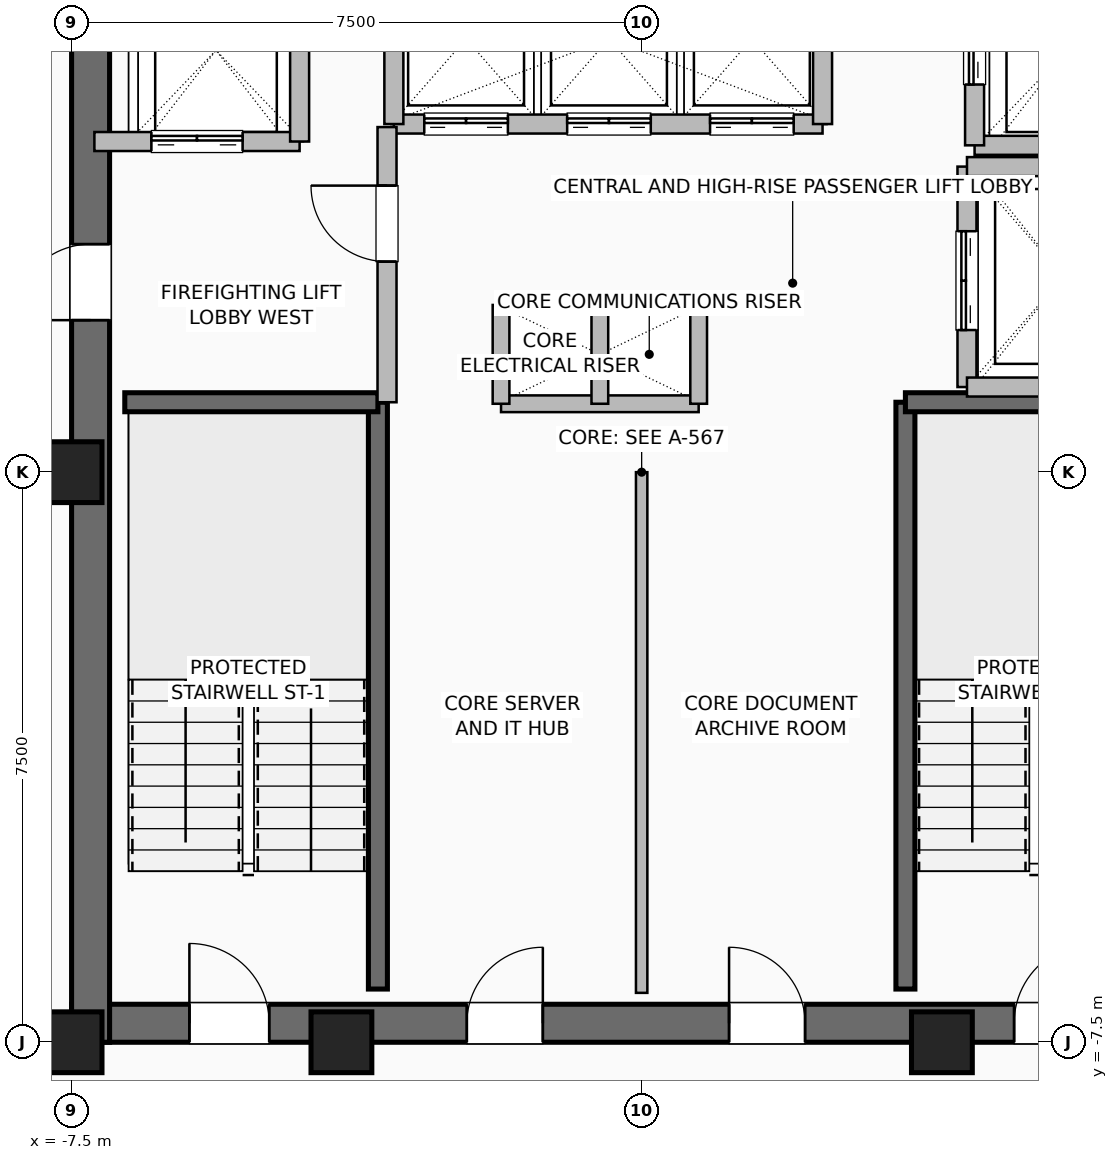
"""IFC4 building model, lengths in metres.
Left out: names, types, materials, properties, quantities, classifications, styles, units other than length and angle.
Written with IfcOpenShell. Run it as: python <this file> out.ifc"""

import sys

from ifc_helpers import new_model, si_unit, direction, frame, frame_2d, origin, origin_2d, place, context, subcontext, project, spatial, rectangle, hollow_rectangle, extrude, element, fill, save


model = new_model("IFC4")
c1 = context("Model", 3, precision=1e-05, world=origin(), true_north=direction((0.0, 1.0)))
c2 = subcontext(c1, "Body", "Model", "MODEL_VIEW")
j1 = project(units=[si_unit("LENGTHUNIT", "METRE"), si_unit("PLANEANGLEUNIT", "RADIAN")], contexts=[c1])
p1 = place(None, origin())
s1 = spatial("IfcSite", under=j1, at=p1, CompositionType="ELEMENT")
p2 = place(p1, origin())
s2 = spatial("IfcBuilding", under=s1, at=p2, CompositionType="ELEMENT")
p3 = place(p2, frame((0.0, 0.0, 268.4)))
s3 = spatial("IfcBuildingStorey", under=s2, at=p3, CompositionType="ELEMENT", Elevation=268.4)
for number, where, z_axis, x_axis in (
    (1, (-7.5, -7.5, 0.0), (0.0, 0.0, 1.0), (1.0, 0.0, 0.0)),
    (2, (-3.95, -7.5, 0.0), (0.0, 0.0, 1.0), (1.0, 0.0, 0.0)),
    (3, (3.95, -7.5, 0.0), (0.0, 0.0, 1.0), (1.0, 0.0, 0.0)),
    (4, (-7.5, 0.0, 0.0), (0.0, 0.0, 1.0), (1.0, 0.0, 0.0)),
):
    element("IfcColumn", number, at=place(p3, frame(where, z_axis=z_axis, x_axis=x_axis)), inside=s3, PredefinedType="COLUMN", context=c2, shape_type="SweptSolid", body=[
        extrude(hollow_rectangle(XDim=0.8, YDim=0.8, WallThickness=0.04, at=origin_2d()), origin(), (0.0, 0.0, 1.0), 3.6),
    ])
p4 = place(p3, frame((-7.5, -7.25, 0.0), z_axis=(0.0, 0.0, 1.0), x_axis=(1.0, 0.0, 0.0)))
e5 = element("IfcWall", 5, at=p4, inside=s3, PredefinedType="SHEAR", context=c2, shape_type="SweptSolid", body=[
    extrude(rectangle(XDim=15.0, YDim=0.5, at=frame_2d((7.5, 0.0))), origin(), (0.0, 0.0, 1.0), 3.36),
])
p5 = place(p4, frame((1.55, 0.0, 0.0)))
e6 = element("IfcOpeningElement", 6, at=p5, cuts=e5, PredefinedType="OPENING", context=c2, shape_type="SweptSolid", body=[
    extrude(rectangle(XDim=1.05, YDim=2.08, at=frame_2d((0.525, 1.04))), frame((0.0, 0.26, 0.0), z_axis=(0.0, -1.0, 0.0), x_axis=(1.0, 0.0, 0.0)), (0.0, 0.0, 1.0), 0.52),
])
p6 = place(p4, frame((12.4, 0.0, 0.0)))
e7 = element("IfcOpeningElement", 7, at=p6, cuts=e5, PredefinedType="OPENING", context=c2, shape_type="SweptSolid", body=[
    extrude(rectangle(XDim=1.05, YDim=2.08, at=frame_2d((0.525, 1.04))), frame((0.0, 0.26, 0.0), z_axis=(0.0, -1.0, 0.0), x_axis=(1.0, 0.0, 0.0)), (0.0, 0.0, 1.0), 0.52),
])
p7 = place(p4, frame((5.2, 0.0, 0.0)))
e8 = element("IfcOpeningElement", 8, at=p7, cuts=e5, PredefinedType="OPENING", context=c2, shape_type="SweptSolid", body=[
    extrude(rectangle(XDim=1.0, YDim=2.08, at=frame_2d((0.5, 1.04))), frame((0.0, 0.26, 0.0), z_axis=(0.0, -1.0, 0.0), x_axis=(1.0, 0.0, 0.0)), (0.0, 0.0, 1.0), 0.52),
])
p8 = place(p4, frame((8.65, 0.0, 0.0)))
e9 = element("IfcOpeningElement", 9, at=p8, cuts=e5, PredefinedType="OPENING", context=c2, shape_type="SweptSolid", body=[
    extrude(rectangle(XDim=1.0, YDim=2.08, at=frame_2d((0.5, 1.04))), frame((0.0, 0.26, 0.0), z_axis=(0.0, -1.0, 0.0), x_axis=(1.0, 0.0, 0.0)), (0.0, 0.0, 1.0), 0.52),
])
p9 = place(p3, frame((-7.25, -7.5, 0.0), z_axis=(0.0, 0.0, 1.0), x_axis=(0.0, 1.0, 0.0)))
e10 = element("IfcWall", 10, at=p9, inside=s3, PredefinedType="SHEAR", context=c2, shape_type="SweptSolid", body=[
    extrude(rectangle(XDim=15.0, YDim=0.5, at=frame_2d((7.5, 0.0))), origin(), (0.0, 0.0, 1.0), 3.36),
])
p10 = place(p9, frame((9.5, 0.0, 0.0)))
e11 = element("IfcOpeningElement", 11, at=p10, cuts=e10, PredefinedType="OPENING", context=c2, shape_type="SweptSolid", body=[
    extrude(rectangle(XDim=1.0, YDim=2.08, at=frame_2d((0.5, 1.04))), frame((0.0, 0.26, 0.0), z_axis=(0.0, -1.0, 0.0), x_axis=(1.0, 0.0, 0.0)), (0.0, 0.0, 1.0), 0.52),
])
p11 = place(p3, frame((-3.47, -6.8, 0.0), z_axis=(0.0, 0.0, 1.0), x_axis=(0.0, 1.0, 0.0)))
e12 = element("IfcWall", 12, at=p11, inside=s3, PredefinedType="SHEAR", context=c2, shape_type="SweptSolid", body=[
    extrude(rectangle(XDim=7.72, YDim=0.25, at=frame_2d((3.86, 0.0))), origin(), (0.0, 0.0, 1.0), 3.36),
])
p12 = place(p3, frame((-6.8, 0.92, 0.0), z_axis=(0.0, 0.0, 1.0), x_axis=(1.0, 0.0, 0.0)))
e13 = element("IfcWall", 13, at=p12, inside=s3, PredefinedType="SHEAR", context=c2, shape_type="SweptSolid", body=[
    extrude(rectangle(XDim=3.33, YDim=0.25, at=frame_2d((1.665, 0.0))), origin(), (0.0, 0.0, 1.0), 3.36),
])
p13 = place(p3, frame((3.47, -6.8, 0.0), z_axis=(0.0, 0.0, 1.0), x_axis=(0.0, 1.0, 0.0)))
e14 = element("IfcWall", 14, at=p13, inside=s3, PredefinedType="SHEAR", context=c2, shape_type="SweptSolid", body=[
    extrude(rectangle(XDim=7.72, YDim=0.25, at=frame_2d((3.86, 0.0))), origin(), (0.0, 0.0, 1.0), 3.36),
])
p14 = place(p3, frame((3.47, 0.92, 0.0), z_axis=(0.0, 0.0, 1.0), x_axis=(1.0, 0.0, 0.0)))
e15 = element("IfcWall", 15, at=p14, inside=s3, PredefinedType="SHEAR", context=c2, shape_type="SweptSolid", body=[
    extrude(rectangle(XDim=3.33, YDim=0.25, at=frame_2d((1.665, 0.0))), origin(), (0.0, 0.0, 1.0), 3.36),
])
for number, where, z_axis, x_axis in (
    (16, (-1.85, 2.2, 0.0), (0.0, 0.0, 1.0), (1.0, 0.0, 0.0)),
    (17, (-1.85, 0.9, 0.0), (0.0, 0.0, 1.0), (1.0, 0.0, 0.0)),
):
    element("IfcWall", number, at=place(p3, frame(where, z_axis=z_axis, x_axis=x_axis)), inside=s3, PredefinedType="PARTITIONING", context=c2, shape_type="SweptSolid", body=[
        extrude(rectangle(XDim=2.6, YDim=0.22, at=frame_2d((1.3, 0.0))), origin(), (0.0, 0.0, 1.0), 3.36),
    ])
for number, where, z_axis, x_axis in (
    (18, (-0.55, 0.9, 0.0), (0.0, 0.0, 1.0), (0.0, 1.0, 0.0)),
    (19, (0.75, 0.9, 0.0), (0.0, 0.0, 1.0), (0.0, 1.0, 0.0)),
    (20, (-1.85, 0.9, 0.0), (0.0, 0.0, 1.0), (0.0, 1.0, 0.0)),
):
    element("IfcWall", number, at=place(p3, frame(where, z_axis=z_axis, x_axis=x_axis)), inside=s3, PredefinedType="PARTITIONING", context=c2, shape_type="SweptSolid", body=[
        extrude(rectangle(XDim=1.3, YDim=0.22, at=frame_2d((0.65, 0.0))), origin(), (0.0, 0.0, 1.0), 3.36),
    ])
p15 = place(p3, frame((-3.26, 4.58, 0.0), z_axis=(0.0, 0.0, 1.0), x_axis=(1.0, 0.0, 0.0)))
e21 = element("IfcWall", 21, at=p15, inside=s3, PredefinedType="SHEAR", context=c2, shape_type="SweptSolid", body=[
    extrude(rectangle(XDim=5.64, YDim=0.25, at=frame_2d((2.82, 0.0))), origin(), (0.0, 0.0, 1.0), 3.36),
])
p16 = place(p15, frame((0.4, 0.0, 0.0)))
e22 = element("IfcOpeningElement", 22, at=p16, cuts=e21, PredefinedType="OPENING", context=c2, shape_type="SweptSolid", body=[
    extrude(rectangle(XDim=1.1, YDim=2.2, at=frame_2d((0.55, 1.1))), frame((0.0, 0.135, 0.0), z_axis=(0.0, -1.0, 0.0), x_axis=(1.0, 0.0, 0.0)), (0.0, 0.0, 1.0), 0.27),
])
p17 = place(p15, frame((2.28, 0.0, 0.0)))
e23 = element("IfcOpeningElement", 23, at=p17, cuts=e21, PredefinedType="OPENING", context=c2, shape_type="SweptSolid", body=[
    extrude(rectangle(XDim=1.1, YDim=2.2, at=frame_2d((0.55, 1.1))), frame((0.0, 0.135, 0.0), z_axis=(0.0, -1.0, 0.0), x_axis=(1.0, 0.0, 0.0)), (0.0, 0.0, 1.0), 0.27),
])
p18 = place(p15, frame((4.16, 0.0, 0.0)))
e24 = element("IfcOpeningElement", 24, at=p18, cuts=e21, PredefinedType="OPENING", context=c2, shape_type="SweptSolid", body=[
    extrude(rectangle(XDim=1.1, YDim=2.2, at=frame_2d((0.55, 1.1))), frame((0.0, 0.135, 0.0), z_axis=(0.0, -1.0, 0.0), x_axis=(1.0, 0.0, 0.0)), (0.0, 0.0, 1.0), 0.27),
])
for number, where, z_axis, x_axis in (
    (25, (-3.26, 4.58, 0.0), (0.0, 0.0, 1.0), (0.0, 1.0, 0.0)),
    (26, (2.38, 4.58, 0.0), (0.0, 0.0, 1.0), (0.0, 1.0, 0.0)),
):
    element("IfcWall", number, at=place(p3, frame(where, z_axis=z_axis, x_axis=x_axis)), inside=s3, PredefinedType="SHEAR", context=c2, shape_type="SweptSolid", body=[
        extrude(rectangle(XDim=2.22, YDim=0.25, at=frame_2d((1.11, 0.0))), origin(), (0.0, 0.0, 1.0), 3.36),
    ])
p19 = place(p3, frame((-7.2, 4.35, 0.0), z_axis=(0.0, 0.0, 1.0), x_axis=(1.0, 0.0, 0.0)))
e27 = element("IfcWall", 27, at=p19, inside=s3, PredefinedType="SHEAR", context=c2, shape_type="SweptSolid", body=[
    extrude(rectangle(XDim=2.7, YDim=0.25, at=frame_2d((1.35, 0.0))), origin(), (0.0, 0.0, 1.0), 3.36),
])
p20 = place(p19, frame((0.75, 0.0, 0.0)))
e28 = element("IfcOpeningElement", 28, at=p20, cuts=e27, PredefinedType="OPENING", context=c2, shape_type="SweptSolid", body=[
    extrude(rectangle(XDim=1.2, YDim=2.2, at=frame_2d((0.6, 1.1))), frame((0.0, 0.135, 0.0), z_axis=(0.0, -1.0, 0.0), x_axis=(1.0, 0.0, 0.0)), (0.0, 0.0, 1.0), 0.27),
])
p21 = place(p3, frame((-4.5, 4.35, 0.0), z_axis=(0.0, 0.0, 1.0), x_axis=(0.0, 1.0, 0.0)))
e29 = element("IfcWall", 29, at=p21, inside=s3, PredefinedType="SHEAR", context=c2, shape_type="SweptSolid", body=[
    extrude(rectangle(XDim=2.85, YDim=0.25, at=frame_2d((1.425, 0.0))), origin(), (0.0, 0.0, 1.0), 3.36),
])
p22 = place(p3, frame((4.38, 4.3, 0.0), z_axis=(0.0, 0.0, 1.0), x_axis=(1.0, 0.0, 0.0)))
e30 = element("IfcWall", 30, at=p22, inside=s3, PredefinedType="SHEAR", context=c2, shape_type="SweptSolid", body=[
    extrude(rectangle(XDim=2.42, YDim=0.25, at=frame_2d((1.21, 0.0))), origin(), (0.0, 0.0, 1.0), 3.36),
])
p23 = place(p3, frame((4.38, 4.3, 0.0), z_axis=(0.0, 0.0, 1.0), x_axis=(0.0, 1.0, 0.0)))
e31 = element("IfcWall", 31, at=p23, inside=s3, PredefinedType="SHEAR", context=c2, shape_type="SweptSolid", body=[
    extrude(rectangle(XDim=2.5, YDim=0.25, at=frame_2d((1.25, 0.0))), origin(), (0.0, 0.0, 1.0), 3.36),
])
p24 = place(p23, frame((0.8, 0.0, 0.0)))
e32 = element("IfcOpeningElement", 32, at=p24, cuts=e31, PredefinedType="OPENING", context=c2, shape_type="SweptSolid", body=[
    extrude(rectangle(XDim=1.2, YDim=2.2, at=frame_2d((0.6, 1.1))), frame((0.0, 0.135, 0.0), z_axis=(0.0, -1.0, 0.0), x_axis=(1.0, 0.0, 0.0)), (0.0, 0.0, 1.0), 0.27),
])
p25 = place(p3, frame((4.28, 1.12, 0.0), z_axis=(0.0, 0.0, 1.0), x_axis=(0.0, 1.0, 0.0)))
e33 = element("IfcWall", 33, at=p25, inside=s3, PredefinedType="SHEAR", context=c2, shape_type="SweptSolid", body=[
    extrude(rectangle(XDim=2.9, YDim=0.25, at=frame_2d((1.45, 0.0))), origin(), (0.0, 0.0, 1.0), 3.36),
])
p26 = place(p25, frame((0.75, 0.0, 0.0)))
e34 = element("IfcOpeningElement", 34, at=p26, cuts=e33, PredefinedType="OPENING", context=c2, shape_type="SweptSolid", body=[
    extrude(rectangle(XDim=1.3, YDim=2.3, at=frame_2d((0.65, 1.15))), frame((0.0, 0.135, 0.0), z_axis=(0.0, -1.0, 0.0), x_axis=(1.0, 0.0, 0.0)), (0.0, 0.0, 1.0), 0.27),
])
for number, where, z_axis, x_axis in (
    (35, (4.28, 1.12, 0.0), (0.0, 0.0, 1.0), (1.0, 0.0, 0.0)),
    (36, (4.28, 4.02, 0.0), (0.0, 0.0, 1.0), (1.0, 0.0, 0.0)),
):
    element("IfcWall", number, at=place(p3, frame(where, z_axis=z_axis, x_axis=x_axis)), inside=s3, PredefinedType="SHEAR", context=c2, shape_type="SweptSolid", body=[
        extrude(rectangle(XDim=2.52, YDim=0.25, at=frame_2d((1.26, 0.0))), origin(), (0.0, 0.0, 1.0), 3.36),
    ])
p27 = place(p3, frame((-3.35, 0.92, 0.0), z_axis=(0.0, 0.0, 1.0), x_axis=(0.0, 1.0, 0.0)))
e37 = element("IfcWall", 37, at=p27, inside=s3, PredefinedType="SHEAR", context=c2, shape_type="SweptSolid", body=[
    extrude(rectangle(XDim=3.62, YDim=0.25, at=frame_2d((1.81, 0.0))), origin(), (0.0, 0.0, 1.0), 3.36),
])
p28 = place(p27, frame((1.85, 0.0, 0.0)))
e38 = element("IfcOpeningElement", 38, at=p28, cuts=e37, PredefinedType="OPENING", context=c2, shape_type="SweptSolid", body=[
    extrude(rectangle(XDim=1.0, YDim=2.08, at=frame_2d((0.5, 1.04))), frame((0.0, 0.135, 0.0), z_axis=(0.0, -1.0, 0.0), x_axis=(1.0, 0.0, 0.0)), (0.0, 0.0, 1.0), 0.27),
])
p29 = place(p3, frame((0.0, -6.85, 0.0), z_axis=(0.0, 0.0, 1.0), x_axis=(0.0, 1.0, 0.0)))
e39 = element("IfcWall", 39, at=p29, inside=s3, PredefinedType="PARTITIONING", context=c2, shape_type="SweptSolid", body=[
    extrude(rectangle(XDim=6.85, YDim=0.15, at=frame_2d((3.425, 0.0))), origin(), (0.0, 0.0, 1.0), 3.36),
])
p30 = place(p5, origin())
e40 = element("IfcDoor", 40, at=p30, inside=s3, OperationType="SINGLE_SWING_LEFT", PredefinedType="DOOR", context=c2, shape_type="SweptSolid", body=[
    extrude(rectangle(XDim=1.05, YDim=2.08, at=frame_2d((0.525, 1.04))), frame((0.0, 0.025, 0.0), z_axis=(0.0, -1.0, 0.0), x_axis=(1.0, 0.0, 0.0)), (0.0, 0.0, 1.0), 0.05),
])
fill(e6, e40)
p31 = place(p6, origin())
e41 = element("IfcDoor", 41, at=p31, inside=s3, OperationType="SINGLE_SWING_RIGHT", PredefinedType="DOOR", context=c2, shape_type="SweptSolid", body=[
    extrude(rectangle(XDim=1.05, YDim=2.08, at=frame_2d((0.525, 1.04))), frame((0.0, 0.025, 0.0), z_axis=(0.0, -1.0, 0.0), x_axis=(1.0, 0.0, 0.0)), (0.0, 0.0, 1.0), 0.05),
])
fill(e7, e41)
p32 = place(p10, origin())
e42 = element("IfcDoor", 42, at=p32, inside=s3, OperationType="SINGLE_SWING_LEFT", PredefinedType="DOOR", context=c2, shape_type="SweptSolid", body=[
    extrude(rectangle(XDim=1.0, YDim=2.08, at=frame_2d((0.5, 1.04))), frame((0.0, 0.025, 0.0), z_axis=(0.0, -1.0, 0.0), x_axis=(1.0, 0.0, 0.0)), (0.0, 0.0, 1.0), 0.05),
])
fill(e11, e42)
p33 = place(p7, origin())
e43 = element("IfcDoor", 43, at=p33, inside=s3, OperationType="SINGLE_SWING_RIGHT", PredefinedType="DOOR", context=c2, shape_type="SweptSolid", body=[
    extrude(rectangle(XDim=1.0, YDim=2.08, at=frame_2d((0.5, 1.04))), frame((0.0, 0.025, 0.0), z_axis=(0.0, -1.0, 0.0), x_axis=(1.0, 0.0, 0.0)), (0.0, 0.0, 1.0), 0.05),
])
fill(e8, e43)
p34 = place(p8, origin())
e44 = element("IfcDoor", 44, at=p34, inside=s3, OperationType="SINGLE_SWING_LEFT", PredefinedType="DOOR", context=c2, shape_type="SweptSolid", body=[
    extrude(rectangle(XDim=1.0, YDim=2.08, at=frame_2d((0.5, 1.04))), frame((0.0, 0.025, 0.0), z_axis=(0.0, -1.0, 0.0), x_axis=(1.0, 0.0, 0.0)), (0.0, 0.0, 1.0), 0.05),
])
fill(e9, e44)
p35 = place(p16, origin())
e45 = element("IfcDoor", 45, at=p35, inside=s3, OperationType="DOUBLE_DOOR_SLIDING", PredefinedType="DOOR", context=c2, shape_type="SweptSolid", body=[
    extrude(rectangle(XDim=1.1, YDim=2.2, at=frame_2d((0.55, 1.1))), frame((0.0, 0.025, 0.0), z_axis=(0.0, -1.0, 0.0), x_axis=(1.0, 0.0, 0.0)), (0.0, 0.0, 1.0), 0.05),
])
fill(e22, e45)
p36 = place(p17, origin())
e46 = element("IfcDoor", 46, at=p36, inside=s3, OperationType="DOUBLE_DOOR_SLIDING", PredefinedType="DOOR", context=c2, shape_type="SweptSolid", body=[
    extrude(rectangle(XDim=1.1, YDim=2.2, at=frame_2d((0.55, 1.1))), frame((0.0, 0.025, 0.0), z_axis=(0.0, -1.0, 0.0), x_axis=(1.0, 0.0, 0.0)), (0.0, 0.0, 1.0), 0.05),
])
fill(e23, e46)
p37 = place(p18, origin())
e47 = element("IfcDoor", 47, at=p37, inside=s3, OperationType="DOUBLE_DOOR_SLIDING", PredefinedType="DOOR", context=c2, shape_type="SweptSolid", body=[
    extrude(rectangle(XDim=1.1, YDim=2.2, at=frame_2d((0.55, 1.1))), frame((0.0, 0.025, 0.0), z_axis=(0.0, -1.0, 0.0), x_axis=(1.0, 0.0, 0.0)), (0.0, 0.0, 1.0), 0.05),
])
fill(e24, e47)
p38 = place(p20, origin())
e48 = element("IfcDoor", 48, at=p38, inside=s3, OperationType="DOUBLE_DOOR_SLIDING", PredefinedType="DOOR", context=c2, shape_type="SweptSolid", body=[
    extrude(rectangle(XDim=1.2, YDim=2.2, at=frame_2d((0.6, 1.1))), frame((0.0, 0.025, 0.0), z_axis=(0.0, -1.0, 0.0), x_axis=(1.0, 0.0, 0.0)), (0.0, 0.0, 1.0), 0.05),
])
fill(e28, e48)
p39 = place(p24, origin())
e49 = element("IfcDoor", 49, at=p39, inside=s3, OperationType="DOUBLE_DOOR_SLIDING", PredefinedType="DOOR", context=c2, shape_type="SweptSolid", body=[
    extrude(rectangle(XDim=1.2, YDim=2.2, at=frame_2d((0.6, 1.1))), frame((0.0, 0.025, 0.0), z_axis=(0.0, -1.0, 0.0), x_axis=(1.0, 0.0, 0.0)), (0.0, 0.0, 1.0), 0.05),
])
fill(e32, e49)
p40 = place(p26, origin())
e50 = element("IfcDoor", 50, at=p40, inside=s3, OperationType="DOUBLE_DOOR_SLIDING", PredefinedType="DOOR", context=c2, shape_type="SweptSolid", body=[
    extrude(rectangle(XDim=1.3, YDim=2.3, at=frame_2d((0.65, 1.15))), frame((0.0, 0.025, 0.0), z_axis=(0.0, -1.0, 0.0), x_axis=(1.0, 0.0, 0.0)), (0.0, 0.0, 1.0), 0.05),
])
fill(e34, e50)
p41 = place(p28, origin())
e51 = element("IfcDoor", 51, at=p41, inside=s3, OperationType="SINGLE_SWING_RIGHT", PredefinedType="DOOR", context=c2, shape_type="SweptSolid", body=[
    extrude(rectangle(XDim=1.0, YDim=2.08, at=frame_2d((0.5, 1.04))), frame((0.0, 0.025, 0.0), z_axis=(0.0, -1.0, 0.0), x_axis=(1.0, 0.0, 0.0)), (0.0, 0.0, 1.0), 0.05),
])
fill(e38, e51)
save(model, sys.argv[1])
